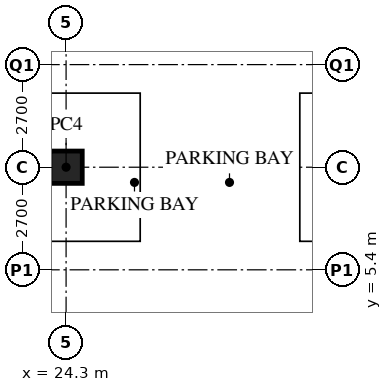
"""IFC4 building model, lengths in metres.
Left out: names, types, materials, properties, quantities, classifications, styles, units other than length and angle.
Written with IfcOpenShell. Run it as: python <this file> out.ifc"""

import sys

from ifc_helpers import new_model, si_unit, direction, frame, origin, origin_2d, place, context, subcontext, project, spatial, hollow_rectangle, extrude, element, save


model = new_model("IFC4")
c1 = context("Model", 3, precision=1e-05, world=origin(), true_north=direction((0.0, 1.0)))
c2 = subcontext(c1, "Body", "Model", "MODEL_VIEW")
j1 = project(units=[si_unit("LENGTHUNIT", "METRE"), si_unit("PLANEANGLEUNIT", "RADIAN")], contexts=[c1])
p1 = place(None, origin())
s1 = spatial("IfcSite", under=j1, at=p1, CompositionType="ELEMENT")
p2 = place(p1, origin())
s2 = spatial("IfcBuilding", under=s1, at=p2, CompositionType="ELEMENT")
p3 = place(p2, frame((0.0, 0.0, -8.4)))
s3 = spatial("IfcBuildingStorey", under=s2, at=p3, CompositionType="ELEMENT", Elevation=-8.4)
p4 = place(p3, frame((24.3, 8.1, 0.0), z_axis=(0.0, 0.0, 1.0), x_axis=(1.0, 0.0, 0.0)))
e1 = element("IfcColumn", 1, at=p4, inside=s3, PredefinedType="COLUMN", context=c2, shape_type="SweptSolid", body=[
    extrude(hollow_rectangle(XDim=0.85, YDim=0.85, WallThickness=0.085, at=origin_2d()), origin(), (0.0, 0.0, 1.0), 4.2),
])
save(model, sys.argv[1])
